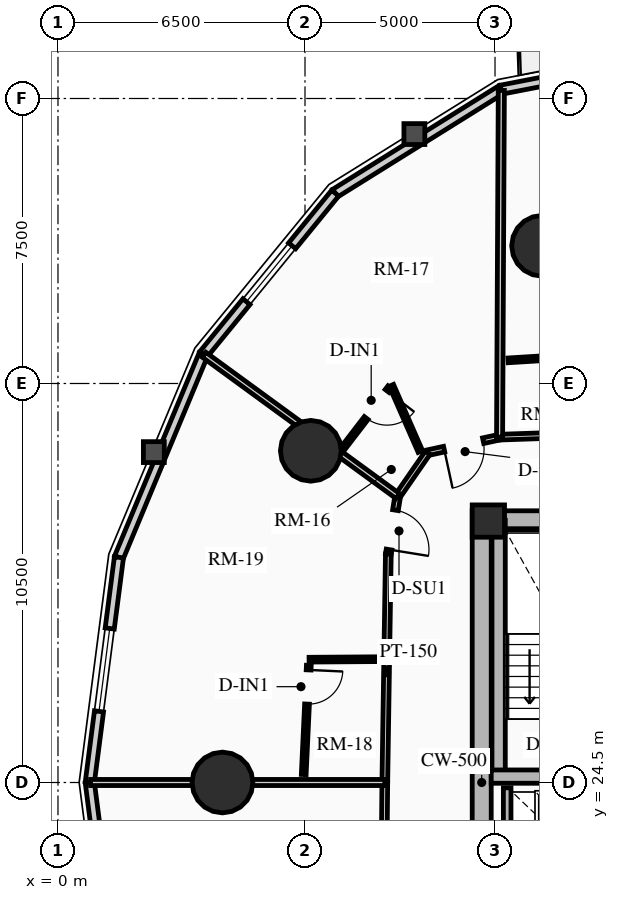
"""IFC4 building model, lengths in metres.
Left out: names, types, materials, properties, quantities, classifications, styles, units other than length and angle.
Written with IfcOpenShell. Run it as: python <this file> out.ifc"""

import sys

from ifc_helpers import new_model, si_unit, direction, frame, frame_2d, origin, origin_2d, place, context, subcontext, project, spatial, rectangle, circle, extrude, source, transform, mapped, element, fill, save


model = new_model("IFC4")
c1 = context("Model", 3, precision=1e-05, world=origin(), true_north=direction((0.0, 1.0)))
c2 = subcontext(c1, "Body", "Model", "MODEL_VIEW")
j1 = project(units=[si_unit("LENGTHUNIT", "METRE"), si_unit("PLANEANGLEUNIT", "RADIAN")], contexts=[c1])
p1 = place(None, origin())
s1 = spatial("IfcSite", under=j1, at=p1, CompositionType="ELEMENT")
p2 = place(p1, origin())
s2 = spatial("IfcBuilding", under=s1, at=p2, CompositionType="ELEMENT")
p3 = place(p2, frame((0.0, 0.0, 51.1)))
s3 = spatial("IfcBuildingStorey", under=s2, at=p3, CompositionType="ELEMENT", Elevation=51.1)
p4 = place(p3, frame((11.15, 17.35, 0.0), z_axis=(0.0, 0.0, 1.0), x_axis=(0.0, 1.0, 0.0)))
e1 = element("IfcWall", 1, at=p4, inside=s3, PredefinedType="SHEAR", context=c2, shape_type="SweptSolid", body=[
    extrude(rectangle(XDim=14.3, YDim=0.5, at=frame_2d((7.15, 0.0))), origin(), (0.0, 0.0, 1.0), 2.91),
])
p5 = place(p3, frame((11.15, 31.4, 0.0), z_axis=(0.0, 0.0, 1.0), x_axis=(1.0, 0.0, 0.0)))
e2 = element("IfcWall", 2, at=p5, inside=s3, PredefinedType="SHEAR", context=c2, shape_type="SweptSolid", body=[
    extrude(rectangle(XDim=10.7, YDim=0.5, at=frame_2d((5.35, 0.0))), origin(), (0.0, 0.0, 1.0), 2.91),
])
m1 = source(origin(), c2, "Body", "SweptSolid", [
    extrude(rectangle(XDim=1.5, YDim=2.02, at=frame_2d((0.75, 1.01))), frame((0.0, 0.26, 0.0), z_axis=(0.0, -1.0, 0.0), x_axis=(1.0, 0.0, 0.0)), (0.0, 0.0, 1.0), 0.52),
])
p6 = place(p5, frame((4.6, 0.0, 0.0)))
e3 = element("IfcOpeningElement", 3, at=p6, cuts=e2, PredefinedType="OPENING", context=c2, shape_type="MappedRepresentation", body=[
    mapped(m1, transform((0.0, 0.0, 0.0), x_axis=(1.0, 0.0, 0.0), y_axis=(0.0, 1.0, 0.0), z_axis=(0.0, 0.0, 1.0), scale=1.0)),
])
p7 = place(p3, frame((11.595, 24.655, 0.0), z_axis=(0.0, 0.0, 1.0), x_axis=(0.0, 1.0, 0.0)))
e4 = element("IfcWall", 4, at=p7, inside=s3, PredefinedType="SHEAR", context=c2, shape_type="SweptSolid", body=[
    extrude(rectangle(XDim=6.745, YDim=0.35, at=frame_2d((3.373, 0.0))), origin(), (0.0, 0.0, 1.0), 2.91),
])
p8 = place(p3, frame((11.4, 24.655, 0.0), z_axis=(0.0, 0.0, 1.0), x_axis=(1.0, 0.0, 0.0)))
e5 = element("IfcWall", 5, at=p8, inside=s3, PredefinedType="SHEAR", context=c2, shape_type="SweptSolid", body=[
    extrude(rectangle(XDim=3.285, YDim=0.35, at=frame_2d((1.643, 0.0))), origin(), (0.0, 0.0, 1.0), 2.91),
])
p9 = place(p3, frame((11.325, 31.38, 0.0), z_axis=(0.0, 0.0, 1.0), x_axis=(1.0, 0.0, 0.0)))
e6 = element("IfcColumn", 6, at=p9, inside=s3, PredefinedType="COLUMN", context=c2, shape_type="SweptSolid", body=[
    extrude(rectangle(XDim=0.85, YDim=0.85, at=origin_2d()), origin(), (0.0, 0.0, 1.0), 2.91),
])
for number, where, z_axis, x_axis in (
    (7, (12.739, 38.623, 0.0), (0.0, 0.0, 1.0), (1.0, 0.0, 0.0)),
    (8, (6.653, 33.229, 0.0), (0.0, 0.0, 1.0), (1.0, 0.0, 0.0)),
    (9, (4.328, 24.5, 0.0), (0.0, 0.0, 1.0), (1.0, 0.0, 0.0)),
):
    element("IfcColumn", number, at=place(p3, frame(where, z_axis=z_axis, x_axis=x_axis)), inside=s3, PredefinedType="USERDEFINED", context=c2, shape_type="SweptSolid", body=[
        extrude(circle(Radius=0.8, at=origin_2d()), origin(), (0.0, 0.0, 1.0), 2.91),
    ])
p10 = place(p3, frame((11.66, 42.732, 0.0), z_axis=(0.0, 0.0, 1.0), x_axis=(0.981725274071, 0.190303668512, 0.0)))
e10 = element("IfcWall", 10, at=p10, inside=s3, PredefinedType="SOLIDWALL", context=c2, shape_type="SweptSolid", body=[
    extrude(rectangle(XDim=4.93, YDim=0.24, at=frame_2d((2.465, 0.0))), origin(), (0.0, 0.0, 1.0), 2.073),
])
m2 = source(origin(), c2, "Body", "SweptSolid", [
    extrude(rectangle(XDim=1.15, YDim=2.005, at=frame_2d((0.575, 1.002))), frame((0.0, 0.13, 0.0), z_axis=(0.0, -1.0, 0.0), x_axis=(1.0, 0.0, 0.0)), (0.0, 0.0, 1.0), 0.26),
])
p11 = place(p10, frame((1.89, 0.0, 0.0)))
e11 = element("IfcOpeningElement", 11, at=p11, cuts=e10, PredefinedType="OPENING", context=c2, shape_type="MappedRepresentation", body=[
    mapped(m2, transform((0.0, 0.0, 0.0), x_axis=(1.0, 0.0, 0.0), y_axis=(0.0, 1.0, 0.0), z_axis=(0.0, 0.0, 1.0), scale=1.0)),
])
p12 = place(p3, frame((7.293, 40.009, 0.0), z_axis=(0.0, 0.0, 1.0), x_axis=(0.848533613342, 0.529141481107, 0.0)))
e12 = element("IfcWall", 12, at=p12, inside=s3, PredefinedType="SOLIDWALL", context=c2, shape_type="SweptSolid", body=[
    extrude(rectangle(XDim=5.146, YDim=0.24, at=frame_2d((2.573, 0.0))), origin(), (0.0, 0.0, 1.0), 2.073),
])
p13 = place(p3, frame((3.828, 35.768, 0.0), z_axis=(0.0, 0.0, 1.0), x_axis=(0.632713287022, 0.77438614168, 0.0)))
e13 = element("IfcWall", 13, at=p13, inside=s3, PredefinedType="SOLIDWALL", context=c2, shape_type="SweptSolid", body=[
    extrude(rectangle(XDim=5.477, YDim=0.24, at=frame_2d((2.738, 0.0))), origin(), (0.0, 0.0, 1.0), 2.073),
])
m3 = source(origin(), c2, "Body", "SweptSolid", [
    extrude(rectangle(XDim=1.9, YDim=1.35, at=frame_2d((0.95, 0.675))), frame((0.0, 0.13, 0.0), z_axis=(0.0, -1.0, 0.0), x_axis=(1.0, 0.0, 0.0)), (0.0, 0.0, 1.0), 0.26),
])
p14 = place(p13, frame((1.788, 0.0, 0.65)))
e14 = element("IfcOpeningElement", 14, at=p14, cuts=e13, PredefinedType="OPENING", context=c2, shape_type="MappedRepresentation", body=[
    mapped(m3, transform((0.0, 0.0, 0.0), x_axis=(1.0, 0.0, 0.0), y_axis=(0.0, 1.0, 0.0), z_axis=(0.0, 0.0, 1.0), scale=1.0)),
])
p15 = place(p3, frame((1.604, 30.424, 0.0), z_axis=(0.0, 0.0, 1.0), x_axis=(0.384348836956, 0.923187939442, 0.0)))
e15 = element("IfcWall", 15, at=p15, inside=s3, PredefinedType="SOLIDWALL", context=c2, shape_type="SweptSolid", body=[
    extrude(rectangle(XDim=5.789, YDim=0.24, at=frame_2d((2.894, 0.0))), origin(), (0.0, 0.0, 1.0), 2.073),
])
p16 = place(p3, frame((0.837, 24.5, 0.0), z_axis=(0.0, 0.0, 1.0), x_axis=(0.128339641463, 0.991730274031, 0.0)))
e16 = element("IfcWall", 16, at=p16, inside=s3, PredefinedType="SOLIDWALL", context=c2, shape_type="SweptSolid", body=[
    extrude(rectangle(XDim=5.973, YDim=0.24, at=frame_2d((2.987, 0.0))), origin(), (0.0, 0.0, 1.0), 2.073),
])
m4 = source(origin(), c2, "Body", "SweptSolid", [
    extrude(rectangle(XDim=2.2, YDim=1.35, at=frame_2d((1.1, 0.675))), frame((0.0, 0.13, 0.0), z_axis=(0.0, -1.0, 0.0), x_axis=(1.0, 0.0, 0.0)), (0.0, 0.0, 1.0), 0.26),
])
p17 = place(p16, frame((1.887, 0.0, 0.65)))
e17 = element("IfcOpeningElement", 17, at=p17, cuts=e16, PredefinedType="OPENING", context=c2, shape_type="MappedRepresentation", body=[
    mapped(m4, transform((0.0, 0.0, 0.0), x_axis=(1.0, 0.0, 0.0), y_axis=(0.0, 1.0, 0.0), z_axis=(0.0, 0.0, 1.0), scale=1.0)),
])
p18 = place(p3, frame((1.604, 18.576, 0.0), z_axis=(0.0, 0.0, 1.0), x_axis=(-0.128339641463, 0.991730274031, 0.0)))
e18 = element("IfcWall", 18, at=p18, inside=s3, PredefinedType="SOLIDWALL", context=c2, shape_type="SweptSolid", body=[
    extrude(rectangle(XDim=5.973, YDim=0.24, at=frame_2d((2.987, 0.0))), origin(), (0.0, 0.0, 1.0), 2.073),
])
p19 = place(p3, frame((11.82, 21.92, 0.0), z_axis=(0.0, 0.0, 1.0), x_axis=(0.0, 1.0, 0.0)))
e19 = element("IfcWall", 19, at=p19, inside=s3, PredefinedType="SHEAR", context=c2, shape_type="SweptSolid", body=[
    extrude(rectangle(XDim=2.44, YDim=0.2, at=frame_2d((1.22, 0.0))), origin(), (0.0, 0.0, 1.0), 2.91),
])
p20 = place(p3, frame((18.143, 33.81, 0.0), z_axis=(0.0, 0.0, 1.0), x_axis=(-0.999423023908, -0.033964971394, 0.0)))
e20 = element("IfcWall", 20, at=p20, inside=s3, PredefinedType="PARTITIONING", context=c2, shape_type="SweptSolid", body=[
    extrude(rectangle(XDim=6.527, YDim=0.15, at=frame_2d((3.263, 0.0))), origin(), (0.0, 0.0, 1.0), 2.159),
])
p21 = place(p3, frame((11.62, 33.588, 0.0), z_axis=(0.0, 0.0, 1.0), x_axis=(-0.977392314559, -0.211433827571, 0.0)))
e21 = element("IfcWall", 21, at=p21, inside=s3, PredefinedType="PARTITIONING", context=c2, shape_type="SweptSolid", body=[
    extrude(rectangle(XDim=1.934, YDim=0.15, at=frame_2d((0.967, 0.0))), origin(), (0.0, 0.0, 1.0), 2.159),
])
m5 = source(origin(), c2, "Body", "SweptSolid", [
    extrude(rectangle(XDim=1.05, YDim=2.015, at=frame_2d((0.525, 1.007))), frame((0.0, 0.085, 0.0), z_axis=(0.0, -1.0, 0.0), x_axis=(1.0, 0.0, 0.0)), (0.0, 0.0, 1.0), 0.17),
])
p22 = place(p21, frame((0.442, 0.0, 0.0)))
e22 = element("IfcOpeningElement", 22, at=p22, cuts=e21, PredefinedType="OPENING", context=c2, shape_type="MappedRepresentation", body=[
    mapped(m5, transform((0.0, 0.0, 0.0), x_axis=(1.0, 0.0, 0.0), y_axis=(0.0, 1.0, 0.0), z_axis=(0.0, 0.0, 1.0), scale=1.0)),
])
p23 = place(p3, frame((9.729, 33.179, 0.0), z_axis=(0.0, 0.0, 1.0), x_axis=(-0.569155068352, -0.822230203878, 0.0)))
e23 = element("IfcWall", 23, at=p23, inside=s3, PredefinedType="PARTITIONING", context=c2, shape_type="SweptSolid", body=[
    extrude(rectangle(XDim=1.387, YDim=0.15, at=frame_2d((0.694, 0.0))), origin(), (0.0, 0.0, 1.0), 2.159),
])
p24 = place(p3, frame((8.94, 32.038, 0.0), z_axis=(0.0, 0.0, 1.0), x_axis=(-0.159917336462, -0.987130409571, 0.0)))
e24 = element("IfcWall", 24, at=p24, inside=s3, PredefinedType="PARTITIONING", context=c2, shape_type="SweptSolid", body=[
    extrude(rectangle(XDim=1.547, YDim=0.15, at=frame_2d((0.773, 0.0))), origin(), (0.0, 0.0, 1.0), 2.205),
])
p25 = place(p24, frame((0.377, 0.0, 0.0)))
e25 = element("IfcOpeningElement", 25, at=p25, cuts=e24, PredefinedType="OPENING", context=c2, shape_type="MappedRepresentation", body=[
    mapped(m5, transform((0.0, 0.0, 0.0), x_axis=(1.0, 0.0, 0.0), y_axis=(0.0, 1.0, 0.0), z_axis=(0.0, 0.0, 1.0), scale=1.0)),
])
p26 = place(p3, frame((8.693, 30.512, 0.0), z_axis=(0.0, 0.0, 1.0), x_axis=(-0.015389665197, -0.99988157209, 0.0)))
e26 = element("IfcWall", 26, at=p26, inside=s3, PredefinedType="PARTITIONING", context=c2, shape_type="SweptSolid", body=[
    extrude(rectangle(XDim=6.012, YDim=0.15, at=frame_2d((3.006, 0.0))), origin(), (0.0, 0.0, 1.0), 2.635),
])
p27 = place(p3, frame((8.6, 24.5, 0.0), z_axis=(0.0, 0.0, 1.0), x_axis=(-0.010076760723, -0.999949228158, 0.0)))
e27 = element("IfcWall", 27, at=p27, inside=s3, PredefinedType="PARTITIONING", context=c2, shape_type="SweptSolid", body=[
    extrude(rectangle(XDim=6.13, YDim=0.15, at=frame_2d((3.065, 0.0))), origin(), (0.0, 0.0, 1.0), 2.159),
])
p28 = place(p27, frame((2.54, 0.0, 0.0)))
e28 = element("IfcOpeningElement", 28, at=p28, cuts=e27, PredefinedType="OPENING", context=c2, shape_type="MappedRepresentation", body=[
    mapped(m5, transform((0.0, 0.0, 0.0), x_axis=(1.0, 0.0, 0.0), y_axis=(0.0, 1.0, 0.0), z_axis=(0.0, 0.0, 1.0), scale=1.0)),
])
p29 = place(p3, frame((11.62, 33.588, 0.0), z_axis=(0.0, 0.0, 1.0), x_axis=(0.005056791532, 0.999987214348, 0.0)))
e29 = element("IfcWall", 29, at=p29, inside=s3, PredefinedType="PARTITIONING", context=c2, shape_type="SweptSolid", body=[
    extrude(rectangle(XDim=9.125, YDim=0.16, at=frame_2d((4.562, 0.0))), origin(), (0.0, 0.0, 1.0), 2.073),
])
p30 = place(p3, frame((8.94, 32.038, 0.0), z_axis=(0.0, 0.0, 1.0), x_axis=(-0.807831293846, 0.58941377714, 0.0)))
e30 = element("IfcWall", 30, at=p30, inside=s3, PredefinedType="PARTITIONING", context=c2, shape_type="SweptSolid", body=[
    extrude(rectangle(XDim=6.308, YDim=0.16, at=frame_2d((3.154, 0.0))), origin(), (0.0, 0.0, 1.0), 2.073),
])
p31 = place(p3, frame((8.6, 24.5, 0.0), z_axis=(0.0, 0.0, 1.0), x_axis=(-1.0, 0.0, 0.0)))
e31 = element("IfcWall", 31, at=p31, inside=s3, PredefinedType="PARTITIONING", context=c2, shape_type="SweptSolid", body=[
    extrude(rectangle(XDim=7.743, YDim=0.16, at=frame_2d((3.872, 0.0))), origin(), (0.0, 0.0, 1.0), 2.073),
])
p32 = place(p3, frame((14.798, 35.791, 0.0), z_axis=(0.0, 0.0, 1.0), x_axis=(-0.998108365817, -0.06147918417, 0.0)))
e32 = element("IfcWall", 32, at=p32, inside=s3, PredefinedType="PARTITIONING", context=c2, shape_type="SweptSolid", body=[
    extrude(rectangle(XDim=2.958, YDim=0.125, at=frame_2d((1.479, 0.0))), origin(), (0.0, 0.0, 1.0), 2.159),
])
m6 = source(origin(), c2, "Body", "SweptSolid", [
    extrude(rectangle(XDim=0.9, YDim=2.005, at=frame_2d((0.45, 1.002))), frame((0.0, 0.073, 0.0), z_axis=(0.0, -1.0, 0.0), x_axis=(1.0, 0.0, 0.0)), (0.0, 0.0, 1.0), 0.145),
])
p33 = place(p32, frame((0.12, 0.0, 0.0)))
e33 = element("IfcOpeningElement", 33, at=p33, cuts=e32, PredefinedType="OPENING", context=c2, shape_type="MappedRepresentation", body=[
    mapped(m6, transform((0.0, 0.0, 0.0), x_axis=(1.0, 0.0, 0.0), y_axis=(0.0, 1.0, 0.0), z_axis=(0.0, 0.0, 1.0), scale=1.0)),
])
p34 = place(p3, frame((9.535, 33.211, 0.0), z_axis=(0.0, 0.0, 1.0), x_axis=(-0.401687955793, 0.915776602765, 0.0)))
e34 = element("IfcWall", 34, at=p34, inside=s3, PredefinedType="PARTITIONING", context=c2, shape_type="SweptSolid", body=[
    extrude(rectangle(XDim=1.901, YDim=0.125, at=frame_2d((0.95, 0.0))), origin(), (0.0, 0.0, 1.0), 2.635),
])
p35 = place(p3, frame((8.732, 34.899, 0.0), z_axis=(0.0, 0.0, 1.0), x_axis=(-0.609677010074, -0.792649950096, 0.0)))
e35 = element("IfcWall", 35, at=p35, inside=s3, PredefinedType="PARTITIONING", context=c2, shape_type="SweptSolid", body=[
    extrude(rectangle(XDim=2.097, YDim=0.125, at=frame_2d((1.049, 0.0))), origin(), (0.0, 0.0, 1.0), 2.073),
])
p36 = place(p35, frame((0.12, 0.0, 0.0)))
e36 = element("IfcOpeningElement", 36, at=p36, cuts=e35, PredefinedType="OPENING", context=c2, shape_type="MappedRepresentation", body=[
    mapped(m6, transform((0.0, 0.0, 0.0), x_axis=(1.0, 0.0, 0.0), y_axis=(0.0, 1.0, 0.0), z_axis=(0.0, 0.0, 1.0), scale=1.0)),
])
p37 = place(p3, frame((8.429, 27.745, 0.0), z_axis=(0.0, 0.0, 1.0), x_axis=(-0.999976632219, -0.006836301373, 0.0)))
e37 = element("IfcWall", 37, at=p37, inside=s3, PredefinedType="PARTITIONING", context=c2, shape_type="SweptSolid", body=[
    extrude(rectangle(XDim=1.821, YDim=0.125, at=frame_2d((0.911, 0.0))), origin(), (0.0, 0.0, 1.0), 2.635),
])
p38 = place(p3, frame((6.6, 27.583, 0.0), z_axis=(0.0, 0.0, 1.0), x_axis=(-0.046516553412, -0.998917519247, 0.0)))
e38 = element("IfcWall", 38, at=p38, inside=s3, PredefinedType="PARTITIONING", context=c2, shape_type="SweptSolid", body=[
    extrude(rectangle(XDim=2.876, YDim=0.125, at=frame_2d((1.438, 0.0))), origin(), (0.0, 0.0, 1.0), 2.635),
])
p39 = place(p38, frame((0.12, 0.0, 0.0)))
e39 = element("IfcOpeningElement", 39, at=p39, cuts=e38, PredefinedType="OPENING", context=c2, shape_type="MappedRepresentation", body=[
    mapped(m6, transform((0.0, 0.0, 0.0), x_axis=(1.0, 0.0, 0.0), y_axis=(0.0, 1.0, 0.0), z_axis=(0.0, 0.0, 1.0), scale=1.0)),
])
m7 = source(origin(), c2, "Body", "SweptSolid", [
    extrude(rectangle(XDim=1.9, YDim=1.35, at=frame_2d((0.95, 0.675))), frame((0.0, 0.03, 0.0), z_axis=(0.0, -1.0, 0.0), x_axis=(1.0, 0.0, 0.0)), (0.0, 0.0, 1.0), 0.06),
])
p40 = place(p14, origin())
e40 = element("IfcWindow", 40, at=p40, inside=s3, PartitioningType="DOUBLE_PANEL_VERTICAL", PredefinedType="WINDOW", context=c2, shape_type="MappedRepresentation", body=[
    mapped(m7, transform((0.0, 0.0, 0.0), x_axis=(1.0, 0.0, 0.0), y_axis=(0.0, 1.0, 0.0), z_axis=(0.0, 0.0, 1.0), scale=1.0)),
])
fill(e14, e40)
m8 = source(origin(), c2, "Body", "SweptSolid", [
    extrude(rectangle(XDim=2.2, YDim=1.35, at=frame_2d((1.1, 0.675))), frame((0.0, 0.03, 0.0), z_axis=(0.0, -1.0, 0.0), x_axis=(1.0, 0.0, 0.0)), (0.0, 0.0, 1.0), 0.06),
])
p41 = place(p17, origin())
e41 = element("IfcWindow", 41, at=p41, inside=s3, PartitioningType="DOUBLE_PANEL_VERTICAL", PredefinedType="WINDOW", context=c2, shape_type="MappedRepresentation", body=[
    mapped(m8, transform((0.0, 0.0, 0.0), x_axis=(1.0, 0.0, 0.0), y_axis=(0.0, 1.0, 0.0), z_axis=(0.0, 0.0, 1.0), scale=1.0)),
])
fill(e17, e41)
m9 = source(origin(), c2, "Body", "SweptSolid", [
    extrude(rectangle(XDim=1.05, YDim=2.015, at=frame_2d((0.525, 1.007))), frame((0.0, 0.025, 0.0), z_axis=(0.0, -1.0, 0.0), x_axis=(1.0, 0.0, 0.0)), (0.0, 0.0, 1.0), 0.05),
])
p42 = place(p22, origin())
e42 = element("IfcDoor", 42, at=p42, inside=s3, OperationType="SINGLE_SWING_RIGHT", PredefinedType="DOOR", context=c2, shape_type="MappedRepresentation", body=[
    mapped(m9, transform((0.0, 0.0, 0.0), x_axis=(1.0, 0.0, 0.0), y_axis=(0.0, 1.0, 0.0), z_axis=(0.0, 0.0, 1.0), scale=1.0)),
])
fill(e22, e42)
m10 = source(origin(), c2, "Body", "SweptSolid", [
    extrude(rectangle(XDim=0.9, YDim=2.005, at=frame_2d((0.45, 1.002))), frame((0.0, 0.025, 0.0), z_axis=(0.0, -1.0, 0.0), x_axis=(1.0, 0.0, 0.0)), (0.0, 0.0, 1.0), 0.05),
])
p43 = place(p36, origin())
e43 = element("IfcDoor", 43, at=p43, inside=s3, OperationType="SINGLE_SWING_LEFT", PredefinedType="DOOR", context=c2, shape_type="MappedRepresentation", body=[
    mapped(m10, transform((0.0, 0.0, 0.0), x_axis=(1.0, 0.0, 0.0), y_axis=(0.0, 1.0, 0.0), z_axis=(0.0, 0.0, 1.0), scale=1.0)),
])
fill(e36, e43)
p44 = place(p25, origin())
e44 = element("IfcDoor", 44, at=p44, inside=s3, OperationType="SINGLE_SWING_RIGHT", PredefinedType="DOOR", context=c2, shape_type="MappedRepresentation", body=[
    mapped(m9, transform((0.0, 0.0, 0.0), x_axis=(1.0, 0.0, 0.0), y_axis=(0.0, 1.0, 0.0), z_axis=(0.0, 0.0, 1.0), scale=1.0)),
])
fill(e25, e44)
p45 = place(p39, origin())
e45 = element("IfcDoor", 45, at=p45, inside=s3, OperationType="SINGLE_SWING_LEFT", PredefinedType="DOOR", context=c2, shape_type="MappedRepresentation", body=[
    mapped(m10, transform((0.0, 0.0, 0.0), x_axis=(1.0, 0.0, 0.0), y_axis=(0.0, 1.0, 0.0), z_axis=(0.0, 0.0, 1.0), scale=1.0)),
])
fill(e39, e45)
save(model, sys.argv[1])
